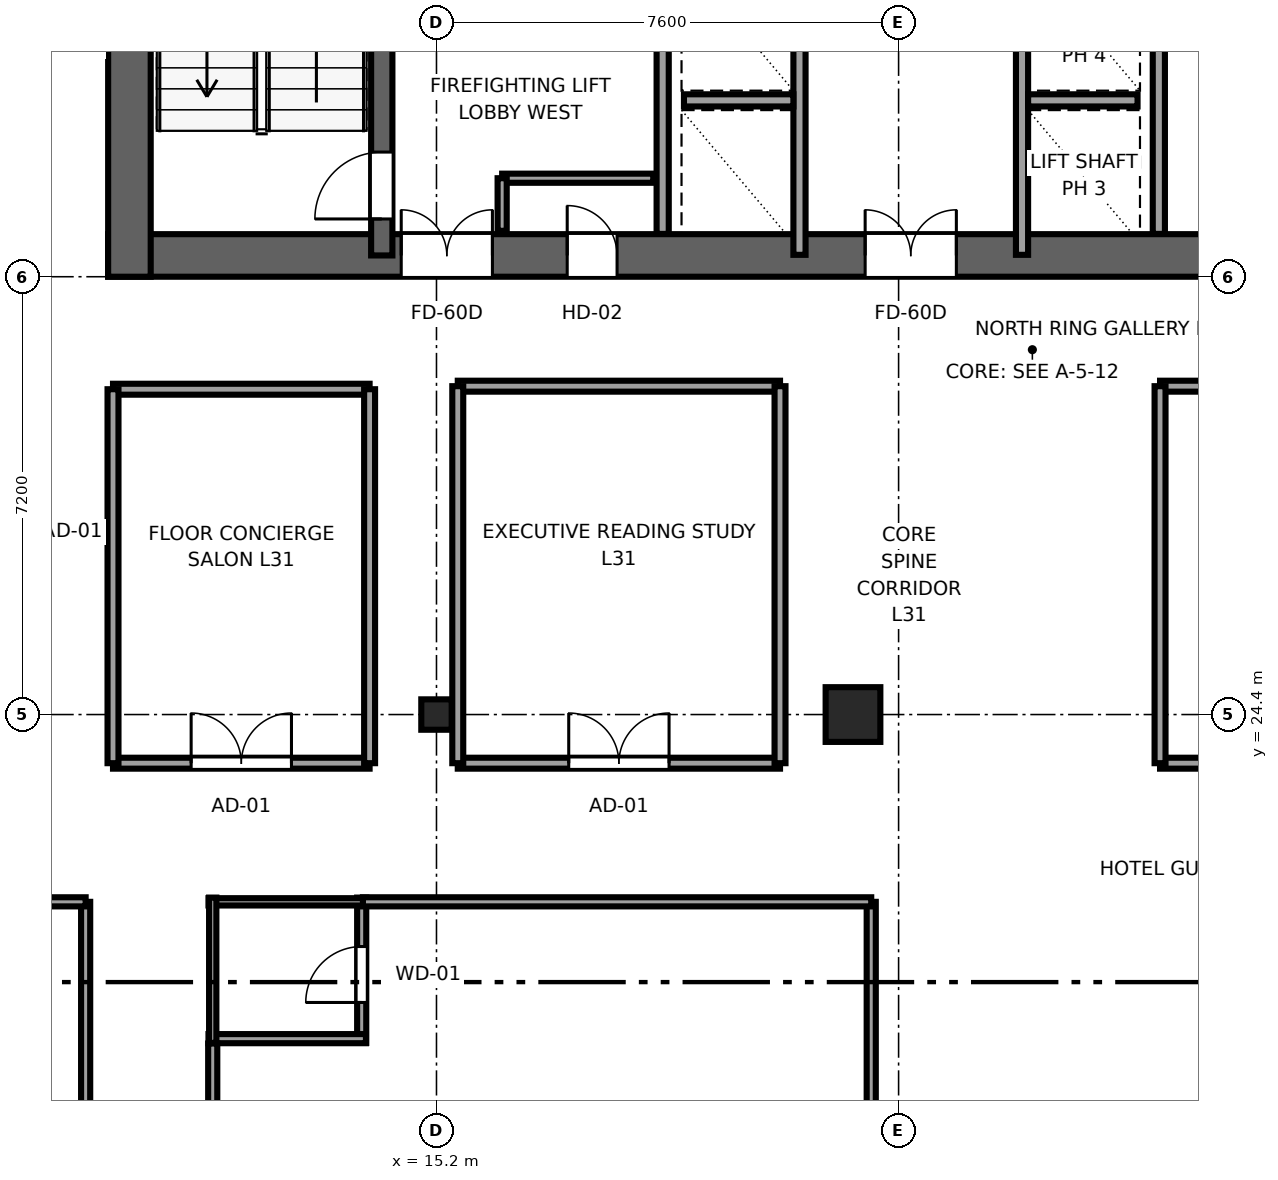
"""IFC4 building model, lengths in metres.
Left out: names, types, materials, properties, quantities, classifications, styles, units other than length and angle.
Written with IfcOpenShell. Run it as: python <this file> out.ifc"""

import sys

from ifc_helpers import new_model, si_unit, direction, frame, frame_2d, origin, origin_2d, place, context, subcontext, project, spatial, rectangle, i_section, extrude, source, transform, mapped, element, fill, save


model = new_model("IFC4")
c1 = context("Model", 3, precision=1e-05, world=origin(), true_north=direction((0.0, 1.0)))
c2 = subcontext(c1, "Body", "Model", "MODEL_VIEW")
j1 = project(units=[si_unit("LENGTHUNIT", "METRE"), si_unit("PLANEANGLEUNIT", "RADIAN")], contexts=[c1])
p1 = place(None, origin())
s1 = spatial("IfcSite", under=j1, at=p1, CompositionType="ELEMENT")
p2 = place(p1, origin())
s2 = spatial("IfcBuilding", under=s1, at=p2, CompositionType="ELEMENT")
p3 = place(p2, frame((0.0, 0.0, 122.2)))
s3 = spatial("IfcBuildingStorey", under=s2, at=p3, CompositionType="ELEMENT", Elevation=122.2)
p4 = place(p3, frame((9.8, 31.95, 0.0), z_axis=(0.0, 0.0, 1.0), x_axis=(1.0, 0.0, 0.0)))
e1 = element("IfcWall", 1, at=p4, inside=s3, PredefinedType="SHEAR", context=c2, shape_type="SweptSolid", body=[
    extrude(rectangle(XDim=26.4, YDim=0.7, at=frame_2d((13.2, 0.0))), origin(), (0.0, 0.0, 1.0), 3.55),
])
p5 = place(p4, frame((6.32, 0.0, 0.0), z_axis=(0.0, 0.0, 1.0), x_axis=(-1.0, 0.0, 0.0)))
e2 = element("IfcOpeningElement", 2, at=p5, cuts=e1, PredefinedType="OPENING", context=c2, shape_type="SweptSolid", body=[
    extrude(rectangle(XDim=1.5, YDim=2.04, at=frame_2d((0.75, 1.02))), frame((0.0, 0.36, 0.0), z_axis=(0.0, -1.0, 0.0), x_axis=(1.0, 0.0, 0.0)), (0.0, 0.0, 1.0), 0.72),
])
p6 = place(p4, frame((13.95, 0.0, 0.0), z_axis=(0.0, 0.0, 1.0), x_axis=(-1.0, 0.0, 0.0)))
e3 = element("IfcOpeningElement", 3, at=p6, cuts=e1, PredefinedType="OPENING", context=c2, shape_type="SweptSolid", body=[
    extrude(rectangle(XDim=1.5, YDim=2.04, at=frame_2d((0.75, 1.02))), frame((0.0, 0.36, 0.0), z_axis=(0.0, -1.0, 0.0), x_axis=(1.0, 0.0, 0.0)), (0.0, 0.0, 1.0), 0.72),
])
p7 = place(p4, frame((20.25, 0.0, 0.0), z_axis=(0.0, 0.0, 1.0), x_axis=(-1.0, 0.0, 0.0)))
e4 = element("IfcOpeningElement", 4, at=p7, cuts=e1, PredefinedType="OPENING", context=c2, shape_type="SweptSolid", body=[
    extrude(rectangle(XDim=1.5, YDim=2.04, at=frame_2d((0.75, 1.02))), frame((0.0, 0.36, 0.0), z_axis=(0.0, -1.0, 0.0), x_axis=(1.0, 0.0, 0.0)), (0.0, 0.0, 1.0), 0.72),
])
p8 = place(p4, frame((8.37, 0.0, 0.0), z_axis=(0.0, 0.0, 1.0), x_axis=(-1.0, 0.0, 0.0)))
e5 = element("IfcOpeningElement", 5, at=p8, cuts=e1, PredefinedType="OPENING", context=c2, shape_type="SweptSolid", body=[
    extrude(rectangle(XDim=0.82, YDim=2.01, at=frame_2d((0.41, 1.005))), frame((0.0, 0.36, 0.0), z_axis=(0.0, -1.0, 0.0), x_axis=(1.0, 0.0, 0.0)), (0.0, 0.0, 1.0), 0.72),
])
p9 = place(p3, frame((10.15, 31.6, 0.0), z_axis=(0.0, 0.0, 1.0), x_axis=(0.0, 1.0, 0.0)))
e6 = element("IfcWall", 6, at=p9, inside=s3, PredefinedType="SHEAR", context=c2, shape_type="SweptSolid", body=[
    extrude(rectangle(XDim=13.6, YDim=0.7, at=frame_2d((6.8, 0.0))), origin(), (0.0, 0.0, 1.0), 3.55),
])
p10 = place(p3, frame((14.3, 31.95, 0.0), z_axis=(0.0, 0.0, 1.0), x_axis=(0.0, 1.0, 0.0)))
e7 = element("IfcWall", 7, at=p10, inside=s3, PredefinedType="SHEAR", context=c2, shape_type="SweptSolid", body=[
    extrude(rectangle(XDim=12.9, YDim=0.35, at=frame_2d((6.45, 0.0))), origin(), (0.0, 0.0, 1.0), 3.55),
])
p11 = place(p10, frame((0.6, 0.0, 0.0)))
e8 = element("IfcOpeningElement", 8, at=p11, cuts=e7, PredefinedType="OPENING", context=c2, shape_type="SweptSolid", body=[
    extrude(rectangle(XDim=1.1, YDim=2.12, at=frame_2d((0.55, 1.06))), frame((0.0, 0.185, 0.0), z_axis=(0.0, -1.0, 0.0), x_axis=(1.0, 0.0, 0.0)), (0.0, 0.0, 1.0), 0.37),
])
m1 = source(origin(), c2, "Body", "SweptSolid", [
    extrude(i_section(OverallWidth=0.5, OverallDepth=0.5, WebThickness=0.022, FlangeThickness=0.034, at=origin_2d()), origin(), (0.0, 0.0, 1.0), 3.55),
])
p12 = place(p3, frame((15.2, 24.4, 0.0), z_axis=(0.0, 0.0, 1.0), x_axis=(1.0, 0.0, 0.0)))
e9 = element("IfcColumn", 9, at=p12, inside=s3, PredefinedType="COLUMN", context=c2, shape_type="MappedRepresentation", body=[
    mapped(m1, transform((0.0, 0.0, 0.0), x_axis=(1.0, 0.0, 0.0), y_axis=(0.0, 1.0, 0.0), z_axis=(0.0, 0.0, 1.0), scale=1.0)),
])
m2 = source(origin(), c2, "Body", "SweptSolid", [
    extrude(rectangle(XDim=0.9, YDim=0.9, at=origin_2d()), origin(), (0.0, 0.0, 1.0), 3.55),
])
p13 = place(p3, frame((22.05, 24.4, 0.0), z_axis=(0.0, 0.0, 1.0), x_axis=(1.0, 0.0, 0.0)))
e10 = element("IfcColumn", 10, at=p13, inside=s3, PredefinedType="COLUMN", context=c2, shape_type="MappedRepresentation", body=[
    mapped(m2, transform((0.0, 0.0, 0.0), x_axis=(1.0, 0.0, 0.0), y_axis=(0.0, 1.0, 0.0), z_axis=(0.0, 0.0, 1.0), scale=1.0)),
])
for number, where, z_axis, x_axis in (
    (11, (18.92, 32.304, 0.0), (0.0, 0.0, 1.0), (0.0, 1.0, 0.0)),
    (12, (27.08, 32.304, 0.0), (0.0, 0.0, 1.0), (0.0, 1.0, 0.0)),
):
    element("IfcWall", number, at=place(p3, frame(where, z_axis=z_axis, x_axis=x_axis)), inside=s3, PredefinedType="SOLIDWALL", context=c2, shape_type="SweptSolid", body=[
        extrude(rectangle(XDim=3.846, YDim=0.2, at=frame_2d((1.923, 0.0))), origin(), (0.0, 0.0, 1.0), 3.37),
    ])
p14 = place(p3, frame((21.17, 31.96, 0.0), z_axis=(0.0, 0.0, 1.0), x_axis=(0.0, 1.0, 0.0)))
e13 = element("IfcWall", 13, at=p14, inside=s3, PredefinedType="SOLIDWALL", context=c2, shape_type="SweptSolid", body=[
    extrude(rectangle(XDim=12.58, YDim=0.2, at=frame_2d((6.29, 0.0))), origin(), (0.0, 0.0, 1.0), 3.37),
])
p15 = place(p14, frame((5.74, 0.0, 0.0)))
e14 = element("IfcOpeningElement", 14, at=p15, cuts=e13, PredefinedType="OPENING", context=c2, shape_type="SweptSolid", body=[
    extrude(rectangle(XDim=1.1, YDim=2.12, at=frame_2d((0.55, 1.06))), frame((0.0, 0.11, 0.0), z_axis=(0.0, -1.0, 0.0), x_axis=(1.0, 0.0, 0.0)), (0.0, 0.0, 1.0), 0.22),
])
p16 = place(p14, frame((8.24, 0.0, 0.0)))
e15 = element("IfcOpeningElement", 15, at=p16, cuts=e13, PredefinedType="OPENING", context=c2, shape_type="SweptSolid", body=[
    extrude(rectangle(XDim=1.1, YDim=2.12, at=frame_2d((0.55, 1.06))), frame((0.0, 0.11, 0.0), z_axis=(0.0, -1.0, 0.0), x_axis=(1.0, 0.0, 0.0)), (0.0, 0.0, 1.0), 0.22),
])
p17 = place(p3, frame((19.27, 34.5, 0.0), z_axis=(0.0, 0.0, 1.0), x_axis=(1.0, 0.0, 0.0)))
e16 = element("IfcWall", 16, at=p17, inside=s3, PredefinedType="SOLIDWALL", context=c2, shape_type="SweptSolid", body=[
    extrude(rectangle(XDim=1.8, YDim=0.2, at=frame_2d((0.9, 0.0))), origin(), (0.0, 0.0, 1.0), 3.37),
])
p18 = place(p3, frame((24.83, 31.96, 0.0), z_axis=(0.0, 0.0, 1.0), x_axis=(0.0, 1.0, 0.0)))
e17 = element("IfcWall", 17, at=p18, inside=s3, PredefinedType="SOLIDWALL", context=c2, shape_type="SweptSolid", body=[
    extrude(rectangle(XDim=12.58, YDim=0.2, at=frame_2d((6.29, 0.0))), origin(), (0.0, 0.0, 1.0), 3.37),
])
p19 = place(p18, frame((5.74, 0.0, 0.0)))
e18 = element("IfcOpeningElement", 18, at=p19, cuts=e17, PredefinedType="OPENING", context=c2, shape_type="SweptSolid", body=[
    extrude(rectangle(XDim=1.1, YDim=2.12, at=frame_2d((0.55, 1.06))), frame((0.0, 0.11, 0.0), z_axis=(0.0, -1.0, 0.0), x_axis=(1.0, 0.0, 0.0)), (0.0, 0.0, 1.0), 0.22),
])
p20 = place(p18, frame((8.24, 0.0, 0.0)))
e19 = element("IfcOpeningElement", 19, at=p20, cuts=e17, PredefinedType="OPENING", context=c2, shape_type="SweptSolid", body=[
    extrude(rectangle(XDim=1.1, YDim=2.12, at=frame_2d((0.55, 1.06))), frame((0.0, 0.11, 0.0), z_axis=(0.0, -1.0, 0.0), x_axis=(1.0, 0.0, 0.0)), (0.0, 0.0, 1.0), 0.22),
])
p21 = place(p3, frame((24.93, 34.5, 0.0), z_axis=(0.0, 0.0, 1.0), x_axis=(1.0, 0.0, 0.0)))
e20 = element("IfcWall", 20, at=p21, inside=s3, PredefinedType="SOLIDWALL", context=c2, shape_type="SweptSolid", body=[
    extrude(rectangle(XDim=1.8, YDim=0.2, at=frame_2d((0.9, 0.0))), origin(), (0.0, 0.0, 1.0), 3.37),
])
p22 = place(p3, frame((13.97, 19.0, 0.0), z_axis=(0.0, 0.0, 1.0), x_axis=(0.0, 1.0, 0.0)))
e21 = element("IfcWall", 21, at=p22, inside=s3, PredefinedType="PARTITIONING", context=c2, shape_type="SweptSolid", body=[
    extrude(rectangle(XDim=2.39, YDim=0.15, at=frame_2d((1.195, 0.0))), origin(), (0.0, 0.0, 1.0), 3.37),
])
p23 = place(p22, frame((0.665, 0.0, 0.0)))
e22 = element("IfcOpeningElement", 22, at=p23, cuts=e21, PredefinedType="OPENING", context=c2, shape_type="SweptSolid", body=[
    extrude(rectangle(XDim=0.92, YDim=2.01, at=frame_2d((0.46, 1.005))), frame((0.0, 0.085, 0.0), z_axis=(0.0, -1.0, 0.0), x_axis=(1.0, 0.0, 0.0)), (0.0, 0.0, 1.0), 0.17),
])
p24 = place(p3, frame((11.45, 19.07, 0.0), z_axis=(0.0, 0.0, 1.0), x_axis=(1.0, 0.0, 0.0)))
e23 = element("IfcWall", 23, at=p24, inside=s3, PredefinedType="PARTITIONING", context=c2, shape_type="SweptSolid", body=[
    extrude(rectangle(XDim=2.59, YDim=0.15, at=frame_2d((1.295, 0.0))), origin(), (0.0, 0.0, 1.0), 3.37),
])
p25 = place(p3, frame((11.45, 21.32, 0.0), z_axis=(0.0, 0.0, 1.0), x_axis=(1.0, 0.0, 0.0)))
e24 = element("IfcWall", 24, at=p25, inside=s3, PredefinedType="PLUMBINGWALL", context=c2, shape_type="SweptSolid", body=[
    extrude(rectangle(XDim=2.59, YDim=0.12, at=frame_2d((1.295, 0.0))), origin(), (0.0, 0.0, 1.0), 3.37),
])
p26 = place(p3, frame((11.52, 19.0, 0.0), z_axis=(0.0, 0.0, 1.0), x_axis=(0.0, 1.0, 0.0)))
e25 = element("IfcWall", 25, at=p26, inside=s3, PredefinedType="PLUMBINGWALL", context=c2, shape_type="SweptSolid", body=[
    extrude(rectangle(XDim=2.39, YDim=0.12, at=frame_2d((1.195, 0.0))), origin(), (0.0, 0.0, 1.0), 2.954),
])
p27 = place(p3, frame((16.28, 33.22, 0.0), z_axis=(0.0, 0.0, 1.0), x_axis=(1.0, 0.0, 0.0)))
e26 = element("IfcWall", 26, at=p27, inside=s3, PredefinedType="PARTITIONING", context=c2, shape_type="SweptSolid", body=[
    extrude(rectangle(XDim=2.485, YDim=0.15, at=frame_2d((1.242, 0.0))), origin(), (0.0, 0.0, 1.0), 3.37),
])
p28 = place(p3, frame((16.28, 32.355, 0.0), z_axis=(0.0, 0.0, 1.0), x_axis=(0.0, 1.0, 0.0)))
e27 = element("IfcWall", 27, at=p28, inside=s3, PredefinedType="PARTITIONING", context=c2, shape_type="SweptSolid", body=[
    extrude(rectangle(XDim=0.865, YDim=0.15, at=frame_2d((0.433, 0.0))), origin(), (0.0, 0.0, 1.0), 3.37),
])
p29 = place(p3, frame((9.43, 13.21, 0.0), z_axis=(0.0, 0.0, 1.0), x_axis=(0.0, 1.0, 0.0)))
e28 = element("IfcWall", 28, at=p29, inside=s3, PredefinedType="PARTITIONING", context=c2, shape_type="SweptSolid", body=[
    extrude(rectangle(XDim=8.11, YDim=0.15, at=frame_2d((4.055, 0.0))), origin(), (0.0, 0.0, 1.0), 3.37),
])
p30 = place(p29, frame((3.545, 0.0, 0.0)))
e29 = element("IfcOpeningElement", 29, at=p30, cuts=e28, PredefinedType="OPENING", context=c2, shape_type="SweptSolid", body=[
    extrude(rectangle(XDim=0.98, YDim=2.12, at=frame_2d((0.49, 1.06))), frame((0.0, 0.085, 0.0), z_axis=(0.0, -1.0, 0.0), x_axis=(1.0, 0.0, 0.0)), (0.0, 0.0, 1.0), 0.17),
])
p31 = place(p3, frame((0.405, 21.32, 0.0), z_axis=(0.0, 0.0, 1.0), x_axis=(1.0, 0.0, 0.0)))
e30 = element("IfcWall", 30, at=p31, inside=s3, PredefinedType="PARTITIONING", context=c2, shape_type="SweptSolid", body=[
    extrude(rectangle(XDim=9.025, YDim=0.15, at=frame_2d((4.512, 0.0))), origin(), (0.0, 0.0, 1.0), 3.37),
])
p32 = place(p3, frame((11.52, 8.28, 0.0), z_axis=(0.0, 0.0, 1.0), x_axis=(0.0, 1.0, 0.0)))
e31 = element("IfcWall", 31, at=p32, inside=s3, PredefinedType="PARTITIONING", context=c2, shape_type="SweptSolid", body=[
    extrude(rectangle(XDim=10.71, YDim=0.15, at=frame_2d((5.355, 0.0))), origin(), (0.0, 0.0, 1.0), 2.954),
])
p33 = place(p32, frame((4.845, 0.0, 0.0)))
e32 = element("IfcOpeningElement", 32, at=p33, cuts=e31, PredefinedType="OPENING", context=c2, shape_type="SweptSolid", body=[
    extrude(rectangle(XDim=0.98, YDim=2.12, at=frame_2d((0.49, 1.06))), frame((0.0, 0.085, 0.0), z_axis=(0.0, -1.0, 0.0), x_axis=(1.0, 0.0, 0.0)), (0.0, 0.0, 1.0), 0.17),
])
p34 = place(p3, frame((22.35, 8.28, 0.0), z_axis=(0.0, 0.0, 1.0), x_axis=(0.0, 1.0, 0.0)))
e33 = element("IfcWall", 33, at=p34, inside=s3, PredefinedType="PARTITIONING", context=c2, shape_type="SweptSolid", body=[
    extrude(rectangle(XDim=13.04, YDim=0.15, at=frame_2d((6.52, 0.0))), origin(), (0.0, 0.0, 1.0), 3.37),
])
p35 = place(p3, frame((13.99, 21.32, 0.0), z_axis=(0.0, 0.0, 1.0), x_axis=(1.0, 0.0, 0.0)))
e34 = element("IfcWall", 34, at=p35, inside=s3, PredefinedType="PARTITIONING", context=c2, shape_type="SweptSolid", body=[
    extrude(rectangle(XDim=8.36, YDim=0.15, at=frame_2d((4.18, 0.0))), origin(), (0.0, 0.0, 1.0), 3.37),
])
p36 = place(p3, frame((9.88, 23.6, 0.0), z_axis=(0.0, 0.0, 1.0), x_axis=(1.0, 0.0, 0.0)))
e35 = element("IfcWall", 35, at=p36, inside=s3, PredefinedType="PARTITIONING", context=c2, shape_type="SweptSolid", body=[
    extrude(rectangle(XDim=4.22, YDim=0.18, at=frame_2d((2.11, 0.0))), origin(), (0.0, 0.0, 1.0), 3.37),
])
p37 = place(p36, frame((1.285, 0.0, 0.0)))
e36 = element("IfcOpeningElement", 36, at=p37, cuts=e35, PredefinedType="OPENING", context=c2, shape_type="SweptSolid", body=[
    extrude(rectangle(XDim=1.65, YDim=2.15, at=frame_2d((0.825, 1.075))), frame((0.0, 0.1, 0.0), z_axis=(0.0, -1.0, 0.0), x_axis=(1.0, 0.0, 0.0)), (0.0, 0.0, 1.0), 0.2),
])
p38 = place(p3, frame((9.88, 29.75, 0.0), z_axis=(0.0, 0.0, 1.0), x_axis=(1.0, 0.0, 0.0)))
e37 = element("IfcWall", 37, at=p38, inside=s3, PredefinedType="PARTITIONING", context=c2, shape_type="SweptSolid", body=[
    extrude(rectangle(XDim=4.22, YDim=0.18, at=frame_2d((2.11, 0.0))), origin(), (0.0, 0.0, 1.0), 3.37),
])
for number, where, z_axis, x_axis in (
    (38, (9.88, 23.6, 0.0), (0.0, 0.0, 1.0), (0.0, 1.0, 0.0)),
    (39, (14.1, 23.6, 0.0), (0.0, 0.0, 1.0), (0.0, 1.0, 0.0)),
):
    element("IfcWall", number, at=place(p3, frame(where, z_axis=z_axis, x_axis=x_axis)), inside=s3, PredefinedType="PARTITIONING", context=c2, shape_type="SweptSolid", body=[
        extrude(rectangle(XDim=6.15, YDim=0.18, at=frame_2d((3.075, 0.0))), origin(), (0.0, 0.0, 1.0), 3.37),
    ])
p39 = place(p3, frame((27.1, 23.6, 0.0), z_axis=(0.0, 0.0, 1.0), x_axis=(1.0, 0.0, 0.0)))
e40 = element("IfcWall", 40, at=p39, inside=s3, PredefinedType="PARTITIONING", context=c2, shape_type="SweptSolid", body=[
    extrude(rectangle(XDim=7.3, YDim=0.18, at=frame_2d((3.65, 0.0))), origin(), (0.0, 0.0, 1.0), 3.37),
])
p40 = place(p39, frame((2.825, 0.0, 0.0)))
e41 = element("IfcOpeningElement", 41, at=p40, cuts=e40, PredefinedType="OPENING", context=c2, shape_type="SweptSolid", body=[
    extrude(rectangle(XDim=1.65, YDim=2.15, at=frame_2d((0.825, 1.075))), frame((0.0, 0.1, 0.0), z_axis=(0.0, -1.0, 0.0), x_axis=(1.0, 0.0, 0.0)), (0.0, 0.0, 1.0), 0.2),
])
p41 = place(p3, frame((27.1, 29.8, 0.0), z_axis=(0.0, 0.0, 1.0), x_axis=(1.0, 0.0, 0.0)))
e42 = element("IfcWall", 42, at=p41, inside=s3, PredefinedType="PARTITIONING", context=c2, shape_type="SweptSolid", body=[
    extrude(rectangle(XDim=7.3, YDim=0.18, at=frame_2d((3.65, 0.0))), origin(), (0.0, 0.0, 1.0), 3.37),
])
p42 = place(p3, frame((27.1, 23.6, 0.0), z_axis=(0.0, 0.0, 1.0), x_axis=(0.0, 1.0, 0.0)))
e43 = element("IfcWall", 43, at=p42, inside=s3, PredefinedType="PARTITIONING", context=c2, shape_type="SweptSolid", body=[
    extrude(rectangle(XDim=6.2, YDim=0.18, at=frame_2d((3.1, 0.0))), origin(), (0.0, 0.0, 1.0), 3.37),
])
p43 = place(p3, frame((15.55, 23.6, 0.0), z_axis=(0.0, 0.0, 1.0), x_axis=(1.0, 0.0, 0.0)))
e44 = element("IfcWall", 44, at=p43, inside=s3, PredefinedType="PARTITIONING", context=c2, shape_type="SweptSolid", body=[
    extrude(rectangle(XDim=5.3, YDim=0.18, at=frame_2d((2.65, 0.0))), origin(), (0.0, 0.0, 1.0), 3.37),
])
p44 = place(p43, frame((1.825, 0.0, 0.0)))
e45 = element("IfcOpeningElement", 45, at=p44, cuts=e44, PredefinedType="OPENING", context=c2, shape_type="SweptSolid", body=[
    extrude(rectangle(XDim=1.65, YDim=2.15, at=frame_2d((0.825, 1.075))), frame((0.0, 0.1, 0.0), z_axis=(0.0, -1.0, 0.0), x_axis=(1.0, 0.0, 0.0)), (0.0, 0.0, 1.0), 0.2),
])
p45 = place(p3, frame((15.55, 29.8, 0.0), z_axis=(0.0, 0.0, 1.0), x_axis=(1.0, 0.0, 0.0)))
e46 = element("IfcWall", 46, at=p45, inside=s3, PredefinedType="PARTITIONING", context=c2, shape_type="SweptSolid", body=[
    extrude(rectangle(XDim=5.3, YDim=0.18, at=frame_2d((2.65, 0.0))), origin(), (0.0, 0.0, 1.0), 3.37),
])
for number, where, z_axis, x_axis in (
    (47, (15.55, 23.6, 0.0), (0.0, 0.0, 1.0), (0.0, 1.0, 0.0)),
    (48, (20.85, 23.6, 0.0), (0.0, 0.0, 1.0), (0.0, 1.0, 0.0)),
):
    element("IfcWall", number, at=place(p3, frame(where, z_axis=z_axis, x_axis=x_axis)), inside=s3, PredefinedType="PARTITIONING", context=c2, shape_type="SweptSolid", body=[
        extrude(rectangle(XDim=6.2, YDim=0.18, at=frame_2d((3.1, 0.0))), origin(), (0.0, 0.0, 1.0), 3.37),
    ])
m3 = source(origin(), c2, "Body", "SweptSolid", [
    extrude(rectangle(XDim=1.1, YDim=2.12, at=frame_2d((0.55, 1.06))), frame((0.0, 0.025, 0.0), z_axis=(0.0, -1.0, 0.0), x_axis=(1.0, 0.0, 0.0)), (0.0, 0.0, 1.0), 0.05),
])
p46 = place(p11, origin())
e49 = element("IfcDoor", 49, at=p46, inside=s3, OperationType="SINGLE_SWING_LEFT", PredefinedType="DOOR", context=c2, shape_type="MappedRepresentation", body=[
    mapped(m3, transform((0.0, 0.0, 0.0), x_axis=(1.0, 0.0, 0.0), y_axis=(0.0, 1.0, 0.0), z_axis=(0.0, 0.0, 1.0), scale=1.0)),
])
fill(e8, e49)
m4 = source(origin(), c2, "Body", "SweptSolid", [
    extrude(rectangle(XDim=1.5, YDim=2.04, at=frame_2d((0.75, 1.02))), frame((0.0, 0.025, 0.0), z_axis=(0.0, -1.0, 0.0), x_axis=(1.0, 0.0, 0.0)), (0.0, 0.0, 1.0), 0.05),
])
p47 = place(p5, origin())
e50 = element("IfcDoor", 50, at=p47, inside=s3, OperationType="DOUBLE_DOOR_SINGLE_SWING", PredefinedType="DOOR", context=c2, shape_type="MappedRepresentation", body=[
    mapped(m4, transform((0.0, 0.0, 0.0), x_axis=(1.0, 0.0, 0.0), y_axis=(0.0, 1.0, 0.0), z_axis=(0.0, 0.0, 1.0), scale=1.0)),
])
fill(e2, e50)
p48 = place(p6, origin())
e51 = element("IfcDoor", 51, at=p48, inside=s3, OperationType="DOUBLE_DOOR_SINGLE_SWING", PredefinedType="DOOR", context=c2, shape_type="MappedRepresentation", body=[
    mapped(m4, transform((0.0, 0.0, 0.0), x_axis=(1.0, 0.0, 0.0), y_axis=(0.0, 1.0, 0.0), z_axis=(0.0, 0.0, 1.0), scale=1.0)),
])
fill(e3, e51)
m5 = source(origin(), c2, "Body", "SweptSolid", [
    extrude(rectangle(XDim=0.82, YDim=2.01, at=frame_2d((0.41, 1.005))), frame((0.0, 0.025, 0.0), z_axis=(0.0, -1.0, 0.0), x_axis=(1.0, 0.0, 0.0)), (0.0, 0.0, 1.0), 0.05),
])
p49 = place(p8, origin())
e52 = element("IfcDoor", 52, at=p49, inside=s3, OperationType="SINGLE_SWING_LEFT", PredefinedType="DOOR", context=c2, shape_type="MappedRepresentation", body=[
    mapped(m5, transform((0.0, 0.0, 0.0), x_axis=(1.0, 0.0, 0.0), y_axis=(0.0, 1.0, 0.0), z_axis=(0.0, 0.0, 1.0), scale=1.0)),
])
fill(e5, e52)
m6 = source(origin(), c2, "Body", "SweptSolid", [
    extrude(rectangle(XDim=0.92, YDim=2.01, at=frame_2d((0.46, 1.005))), frame((0.0, 0.025, 0.0), z_axis=(0.0, -1.0, 0.0), x_axis=(1.0, 0.0, 0.0)), (0.0, 0.0, 1.0), 0.05),
])
p50 = place(p23, origin())
e53 = element("IfcDoor", 53, at=p50, inside=s3, OperationType="SINGLE_SWING_LEFT", PredefinedType="DOOR", context=c2, shape_type="MappedRepresentation", body=[
    mapped(m6, transform((0.0, 0.0, 0.0), x_axis=(1.0, 0.0, 0.0), y_axis=(0.0, 1.0, 0.0), z_axis=(0.0, 0.0, 1.0), scale=1.0)),
])
fill(e22, e53)
m7 = source(origin(), c2, "Body", "SweptSolid", [
    extrude(rectangle(XDim=1.65, YDim=2.15, at=frame_2d((0.825, 1.075))), frame((0.0, 0.025, 0.0), z_axis=(0.0, -1.0, 0.0), x_axis=(1.0, 0.0, 0.0)), (0.0, 0.0, 1.0), 0.05),
])
p51 = place(p37, origin())
e54 = element("IfcDoor", 54, at=p51, inside=s3, OperationType="DOUBLE_DOOR_SINGLE_SWING", PredefinedType="DOOR", context=c2, shape_type="MappedRepresentation", body=[
    mapped(m7, transform((0.0, 0.0, 0.0), x_axis=(1.0, 0.0, 0.0), y_axis=(0.0, 1.0, 0.0), z_axis=(0.0, 0.0, 1.0), scale=1.0)),
])
fill(e36, e54)
p52 = place(p44, origin())
e55 = element("IfcDoor", 55, at=p52, inside=s3, OperationType="DOUBLE_DOOR_SINGLE_SWING", PredefinedType="DOOR", context=c2, shape_type="MappedRepresentation", body=[
    mapped(m7, transform((0.0, 0.0, 0.0), x_axis=(1.0, 0.0, 0.0), y_axis=(0.0, 1.0, 0.0), z_axis=(0.0, 0.0, 1.0), scale=1.0)),
])
fill(e45, e55)
save(model, sys.argv[1])
